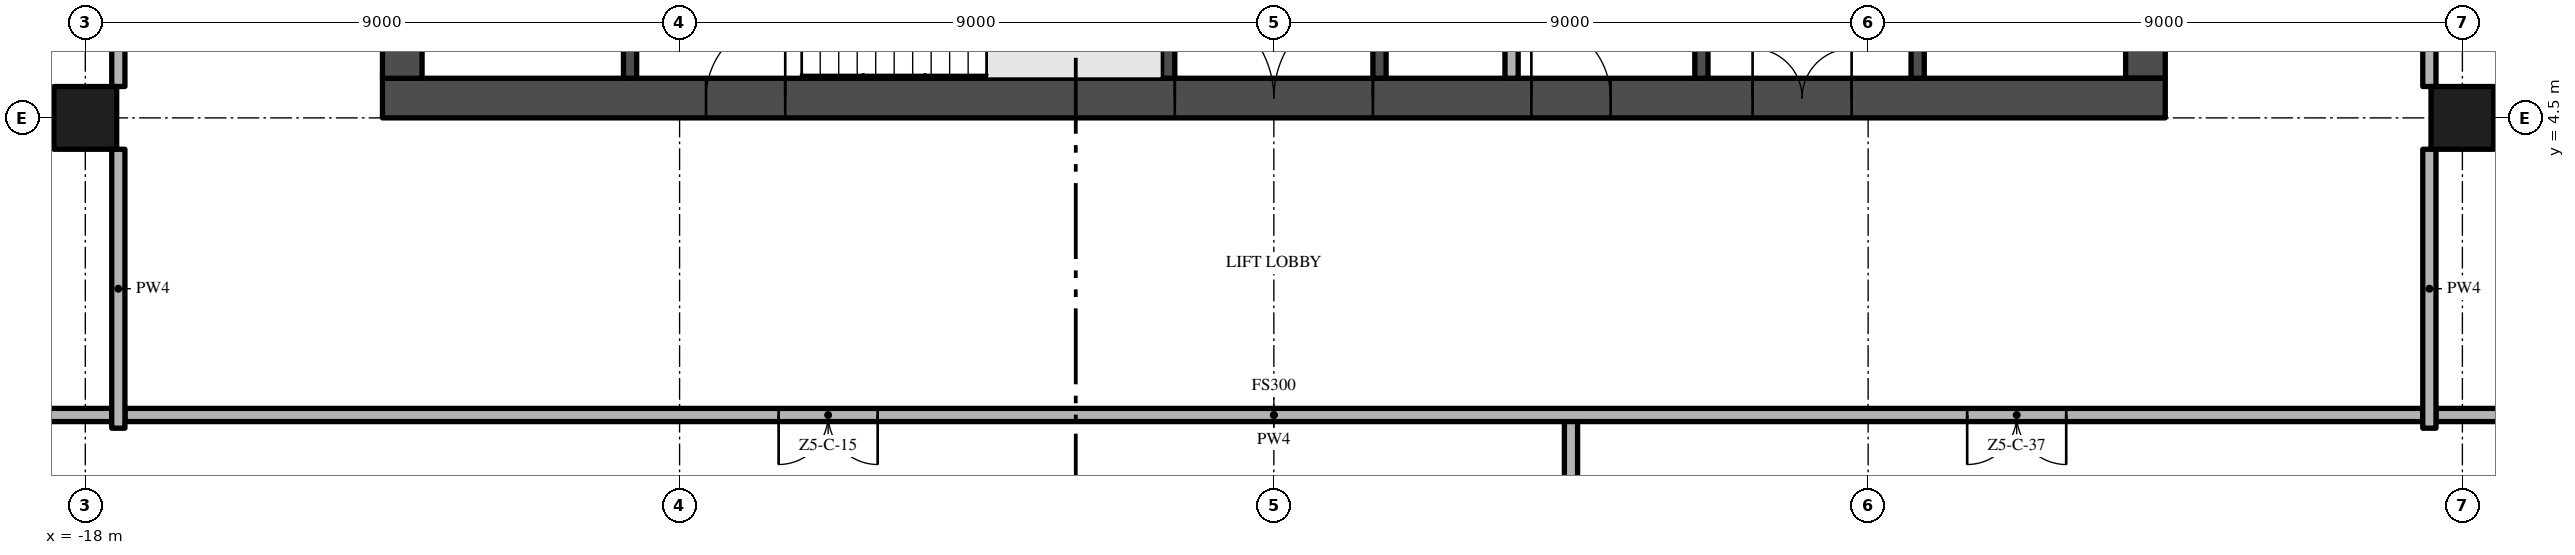
"""IFC4 building model, lengths in metres.
Left out: names, types, materials, properties, quantities, classifications, styles, units other than length and angle.
Written with IfcOpenShell. Run it as: python <this file> out.ifc"""

import sys

from ifc_helpers import new_model, si_unit, direction, frame, frame_2d, origin, origin_2d, place, context, subcontext, project, spatial, rectangle, extrude, element, fill, save


model = new_model("IFC4")
c1 = context("Model", 3, precision=1e-05, world=origin(), true_north=direction((0.0, 1.0)))
c2 = subcontext(c1, "Body", "Model", "MODEL_VIEW")
j1 = project(units=[si_unit("LENGTHUNIT", "METRE"), si_unit("PLANEANGLEUNIT", "RADIAN")], contexts=[c1])
p1 = place(None, origin())
s1 = spatial("IfcSite", under=j1, at=p1, CompositionType="ELEMENT")
p2 = place(p1, origin())
s2 = spatial("IfcBuilding", under=s1, at=p2, CompositionType="ELEMENT")
p3 = place(p2, frame((0.0, 0.0, 265.4)))
s3 = spatial("IfcBuildingStorey", under=s2, at=p3, CompositionType="ELEMENT", Elevation=265.4)
p4 = place(p3, frame((-13.5, 4.8, -0.3), z_axis=(0.0, 0.0, 1.0), x_axis=(1.0, 0.0, 0.0)))
e1 = element("IfcWall", 1, at=p4, inside=s3, PredefinedType="SHEAR", context=c2, shape_type="SweptSolid", body=[
    extrude(rectangle(XDim=27.0, YDim=0.6, at=frame_2d((13.5, 0.0))), origin(), (0.0, 0.0, 1.0), 3.8),
])
p5 = place(p4, frame((12.0, 0.0, 0.3)))
e2 = element("IfcOpeningElement", 2, at=p5, cuts=e1, PredefinedType="OPENING", context=c2, shape_type="SweptSolid", body=[
    extrude(rectangle(XDim=3.0, YDim=2.4, at=frame_2d((1.5, 1.2))), frame((0.0, 0.31, 0.0), z_axis=(0.0, -1.0, 0.0), x_axis=(1.0, 0.0, 0.0)), (0.0, 0.0, 1.0), 0.62),
])
p6 = place(p4, frame((4.9, 0.0, 0.3)))
e3 = element("IfcOpeningElement", 3, at=p6, cuts=e1, PredefinedType="OPENING", context=c2, shape_type="SweptSolid", body=[
    extrude(rectangle(XDim=1.2, YDim=2.2, at=frame_2d((0.6, 1.1))), frame((0.0, 0.31, 0.0), z_axis=(0.0, -1.0, 0.0), x_axis=(1.0, 0.0, 0.0)), (0.0, 0.0, 1.0), 0.62),
])
p7 = place(p4, frame((20.75, 0.0, 0.3)))
e4 = element("IfcOpeningElement", 4, at=p7, cuts=e1, PredefinedType="OPENING", context=c2, shape_type="SweptSolid", body=[
    extrude(rectangle(XDim=1.5, YDim=2.2, at=frame_2d((0.75, 1.1))), frame((0.0, 0.31, 0.0), z_axis=(0.0, -1.0, 0.0), x_axis=(1.0, 0.0, 0.0)), (0.0, 0.0, 1.0), 0.62),
])
p8 = place(p4, frame((17.4, 0.0, 0.3)))
e5 = element("IfcOpeningElement", 5, at=p8, cuts=e1, PredefinedType="OPENING", context=c2, shape_type="SweptSolid", body=[
    extrude(rectangle(XDim=1.2, YDim=2.2, at=frame_2d((0.6, 1.1))), frame((0.0, 0.31, 0.0), z_axis=(0.0, -1.0, 0.0), x_axis=(1.0, 0.0, 0.0)), (0.0, 0.0, 1.0), 0.62),
])
p9 = place(p3, frame((13.2, 5.1, -0.3), z_axis=(0.0, 0.0, 1.0), x_axis=(0.0, 1.0, 0.0)))
e6 = element("IfcWall", 6, at=p9, inside=s3, PredefinedType="SHEAR", context=c2, shape_type="SweptSolid", body=[
    extrude(rectangle(XDim=16.8, YDim=0.6, at=frame_2d((8.4, 0.0))), origin(), (0.0, 0.0, 1.0), 3.8),
])
p10 = place(p9, frame((6.3, 0.0, 0.3)))
e7 = element("IfcOpeningElement", 7, at=p10, cuts=e6, PredefinedType="OPENING", context=c2, shape_type="SweptSolid", body=[
    extrude(rectangle(XDim=1.2, YDim=2.2, at=frame_2d((0.6, 1.1))), frame((0.0, 0.31, 0.0), z_axis=(0.0, -1.0, 0.0), x_axis=(1.0, 0.0, 0.0)), (0.0, 0.0, 1.0), 0.62),
])
p11 = place(p3, frame((-13.2, 21.9, -0.3), z_axis=(0.0, 0.0, 1.0), x_axis=(0.0, -1.0, 0.0)))
e8 = element("IfcWall", 8, at=p11, inside=s3, PredefinedType="SHEAR", context=c2, shape_type="SweptSolid", body=[
    extrude(rectangle(XDim=16.8, YDim=0.6, at=frame_2d((8.4, 0.0))), origin(), (0.0, 0.0, 1.0), 3.8),
])
p12 = place(p11, frame((9.3, 0.0, 0.3)))
e9 = element("IfcOpeningElement", 9, at=p12, cuts=e8, PredefinedType="OPENING", context=c2, shape_type="SweptSolid", body=[
    extrude(rectangle(XDim=1.2, YDim=2.2, at=frame_2d((0.6, 1.1))), frame((0.0, 0.31, 0.0), z_axis=(0.0, -1.0, 0.0), x_axis=(1.0, 0.0, 0.0)), (0.0, 0.0, 1.0), 0.62),
])
for number, where, z_axis, x_axis in (
    (10, (-18.0, 4.5, 0.0), (0.0, 0.0, 1.0), (1.0, 0.0, 0.0)),
    (11, (18.0, 4.5, 0.0), (0.0, 0.0, 1.0), (1.0, 0.0, 0.0)),
):
    element("IfcColumn", number, at=place(p3, frame(where, z_axis=z_axis, x_axis=x_axis)), inside=s3, PredefinedType="COLUMN", context=c2, shape_type="SweptSolid", body=[
        extrude(rectangle(XDim=0.95, YDim=0.95, at=origin_2d()), origin(), (0.0, 0.0, 1.0), 3.5),
    ])
for number, where, z_axis, x_axis in (
    (12, (-9.75, 5.1, 0.0), (0.0, 0.0, 1.0), (0.0, 1.0, 0.0)),
    (13, (-1.6, 5.1, 0.0), (0.0, 0.0, 1.0), (0.0, 1.0, 0.0)),
):
    element("IfcWall", number, at=place(p3, frame(where, z_axis=z_axis, x_axis=x_axis)), inside=s3, PredefinedType="SHEAR", context=c2, shape_type="SweptSolid", body=[
        extrude(rectangle(XDim=2.85, YDim=0.2, at=frame_2d((1.425, 0.0))), origin(), (0.0, 0.0, 1.0), 3.5),
    ])
p13 = place(p3, frame((1.6, 13.5, 0.0), z_axis=(0.0, 0.0, 1.0), x_axis=(0.0, -1.0, 0.0)))
e14 = element("IfcWall", 14, at=p13, inside=s3, PredefinedType="SHEAR", context=c2, shape_type="SweptSolid", body=[
    extrude(rectangle(XDim=8.4, YDim=0.2, at=frame_2d((4.2, 0.0))), origin(), (0.0, 0.0, 1.0), 3.5),
])
p14 = place(p13, frame((3.35, 0.0, 0.0)))
e15 = element("IfcOpeningElement", 15, at=p14, cuts=e14, PredefinedType="OPENING", context=c2, shape_type="SweptSolid", body=[
    extrude(rectangle(XDim=0.9, YDim=2.1, at=frame_2d((0.45, 1.05))), frame((0.0, 0.11, 0.0), z_axis=(0.0, -1.0, 0.0), x_axis=(1.0, 0.0, 0.0)), (0.0, 0.0, 1.0), 0.22),
])
p15 = place(p3, frame((3.6, 13.5, 0.0), z_axis=(0.0, 0.0, 1.0), x_axis=(0.0, -1.0, 0.0)))
e16 = element("IfcWall", 16, at=p15, inside=s3, PredefinedType="PARTITIONING", context=c2, shape_type="SweptSolid", body=[
    extrude(rectangle(XDim=8.4, YDim=0.2, at=frame_2d((4.2, 0.0))), origin(), (0.0, 0.0, 1.0), 3.5),
])
p16 = place(p15, frame((3.75, 0.0, 0.0)))
e17 = element("IfcOpeningElement", 17, at=p16, cuts=e16, PredefinedType="OPENING", context=c2, shape_type="SweptSolid", body=[
    extrude(rectangle(XDim=0.9, YDim=2.1, at=frame_2d((0.45, 1.05))), frame((0.0, 0.11, 0.0), z_axis=(0.0, -1.0, 0.0), x_axis=(1.0, 0.0, 0.0)), (0.0, 0.0, 1.0), 0.22),
])
p17 = place(p3, frame((6.475, 5.1, 0.0), z_axis=(0.0, 0.0, 1.0), x_axis=(0.0, 1.0, 0.0)))
e18 = element("IfcWall", 18, at=p17, inside=s3, PredefinedType="SHEAR", context=c2, shape_type="SweptSolid", body=[
    extrude(rectangle(XDim=7.0, YDim=0.2, at=frame_2d((3.5, 0.0))), origin(), (0.0, 0.0, 1.0), 3.5),
])
p18 = place(p3, frame((9.75, 5.1, 0.0), z_axis=(0.0, 0.0, 1.0), x_axis=(0.0, 1.0, 0.0)))
e19 = element("IfcWall", 19, at=p18, inside=s3, PredefinedType="SHEAR", context=c2, shape_type="SweptSolid", body=[
    extrude(rectangle(XDim=2.5, YDim=0.2, at=frame_2d((1.25, 0.0))), origin(), (0.0, 0.0, 1.0), 3.5),
])
p19 = place(p18, frame((0.85, 0.0, 0.0)))
e20 = element("IfcOpeningElement", 20, at=p19, cuts=e19, PredefinedType="OPENING", context=c2, shape_type="SweptSolid", body=[
    extrude(rectangle(XDim=1.1, YDim=2.1, at=frame_2d((0.55, 1.05))), frame((0.0, 0.11, 0.0), z_axis=(0.0, -1.0, 0.0), x_axis=(1.0, 0.0, 0.0)), (0.0, 0.0, 1.0), 0.22),
])
p20 = place(p3, frame((17.4, 0.0, 0.0), z_axis=(0.0, 0.0, 1.0), x_axis=(-1.0, 0.0, 0.0)))
e21 = element("IfcWall", 21, at=p20, inside=s3, PredefinedType="PARTITIONING", context=c2, shape_type="SweptSolid", body=[
    extrude(rectangle(XDim=34.8, YDim=0.2, at=frame_2d((17.4, 0.0))), origin(), (0.0, 0.0, 1.0), 3.5),
])
p21 = place(p20, frame((23.4, 0.0, 0.0)))
e22 = element("IfcOpeningElement", 22, at=p21, cuts=e21, PredefinedType="OPENING", context=c2, shape_type="SweptSolid", body=[
    extrude(rectangle(XDim=1.5, YDim=2.4, at=frame_2d((0.75, 1.2))), frame((0.0, 0.11, 0.0), z_axis=(0.0, -1.0, 0.0), x_axis=(1.0, 0.0, 0.0)), (0.0, 0.0, 1.0), 0.22),
])
p22 = place(p20, frame((5.4, 0.0, 0.0)))
e23 = element("IfcOpeningElement", 23, at=p22, cuts=e21, PredefinedType="OPENING", context=c2, shape_type="SweptSolid", body=[
    extrude(rectangle(XDim=1.5, YDim=2.4, at=frame_2d((0.75, 1.2))), frame((0.0, 0.11, 0.0), z_axis=(0.0, -1.0, 0.0), x_axis=(1.0, 0.0, 0.0)), (0.0, 0.0, 1.0), 0.22),
])
for number, where, z_axis, x_axis in (
    (24, (-26.7, 0.0, 0.0), (0.0, 0.0, 1.0), (1.0, 0.0, 0.0)),
    (25, (17.6, 0.0, 0.0), (0.0, 0.0, 1.0), (1.0, 0.0, 0.0)),
):
    element("IfcWall", number, at=place(p3, frame(where, z_axis=z_axis, x_axis=x_axis)), inside=s3, PredefinedType="PARTITIONING", context=c2, shape_type="SweptSolid", body=[
        extrude(rectangle(XDim=9.1, YDim=0.2, at=frame_2d((4.55, 0.0))), origin(), (0.0, 0.0, 1.0), 3.5),
    ])
p23 = place(p3, frame((-17.5, -0.2, 0.0), z_axis=(0.0, 0.0, 1.0), x_axis=(0.0, 1.0, 0.0)))
e26 = element("IfcWall", 26, at=p23, inside=s3, PredefinedType="PARTITIONING", context=c2, shape_type="SweptSolid", body=[
    extrude(rectangle(XDim=4.225, YDim=0.2, at=frame_2d((2.112, 0.0))), origin(), (0.0, 0.0, 1.0), 3.5),
])
p24 = place(p3, frame((-17.5, 4.975, 0.0), z_axis=(0.0, 0.0, 1.0), x_axis=(0.0, 1.0, 0.0)))
e27 = element("IfcWall", 27, at=p24, inside=s3, PredefinedType="PARTITIONING", context=c2, shape_type="SweptSolid", body=[
    extrude(rectangle(XDim=8.05, YDim=0.2, at=frame_2d((4.025, 0.0))), origin(), (0.0, 0.0, 1.0), 3.5),
])
p25 = place(p3, frame((4.5, -22.2, 0.0), z_axis=(0.0, 0.0, 1.0), x_axis=(0.0, 1.0, 0.0)))
e28 = element("IfcWall", 28, at=p25, inside=s3, PredefinedType="PARTITIONING", context=c2, shape_type="SweptSolid", body=[
    extrude(rectangle(XDim=22.1, YDim=0.2, at=frame_2d((11.05, 0.0))), origin(), (0.0, 0.0, 1.0), 3.5),
])
p26 = place(p3, frame((17.5, -0.2, 0.0), z_axis=(0.0, 0.0, 1.0), x_axis=(0.0, 1.0, 0.0)))
e29 = element("IfcWall", 29, at=p26, inside=s3, PredefinedType="PARTITIONING", context=c2, shape_type="SweptSolid", body=[
    extrude(rectangle(XDim=4.225, YDim=0.2, at=frame_2d((2.112, 0.0))), origin(), (0.0, 0.0, 1.0), 3.5),
])
p27 = place(p3, frame((17.5, 13.025, 0.0), z_axis=(0.0, 0.0, 1.0), x_axis=(0.0, -1.0, 0.0)))
e30 = element("IfcWall", 30, at=p27, inside=s3, PredefinedType="PARTITIONING", context=c2, shape_type="SweptSolid", body=[
    extrude(rectangle(XDim=8.05, YDim=0.2, at=frame_2d((4.025, 0.0))), origin(), (0.0, 0.0, 1.0), 3.5),
])
p28 = place(p27, frame((5.65, 0.0, 0.0)))
e31 = element("IfcOpeningElement", 31, at=p28, cuts=e30, PredefinedType="OPENING", context=c2, shape_type="SweptSolid", body=[
    extrude(rectangle(XDim=1.2, YDim=2.4, at=frame_2d((0.6, 1.2))), frame((0.0, 0.11, 0.0), z_axis=(0.0, -1.0, 0.0), x_axis=(1.0, 0.0, 0.0)), (0.0, 0.0, 1.0), 0.22),
])
p29 = place(p5, frame((3.0, 0.0, 0.0), z_axis=(0.0, 0.0, 1.0), x_axis=(-1.0, 0.0, 0.0)))
e32 = element("IfcDoor", 32, at=p29, inside=s3, OperationType="DOUBLE_DOOR_SINGLE_SWING", PredefinedType="DOOR", context=c2, shape_type="SweptSolid", body=[
    extrude(rectangle(XDim=3.0, YDim=2.4, at=frame_2d((1.5, 1.2))), frame((0.0, 0.025, 0.0), z_axis=(0.0, -1.0, 0.0), x_axis=(1.0, 0.0, 0.0)), (0.0, 0.0, 1.0), 0.05),
])
fill(e2, e32)
p30 = place(p6, frame((1.2, 0.0, 0.0), z_axis=(0.0, 0.0, 1.0), x_axis=(-1.0, 0.0, 0.0)))
e33 = element("IfcDoor", 33, at=p30, inside=s3, OperationType="SINGLE_SWING_LEFT", PredefinedType="DOOR", context=c2, shape_type="SweptSolid", body=[
    extrude(rectangle(XDim=1.2, YDim=2.2, at=frame_2d((0.6, 1.1))), frame((0.0, 0.025, 0.0), z_axis=(0.0, -1.0, 0.0), x_axis=(1.0, 0.0, 0.0)), (0.0, 0.0, 1.0), 0.05),
])
fill(e3, e33)
p31 = place(p7, frame((1.5, 0.0, 0.0), z_axis=(0.0, 0.0, 1.0), x_axis=(-1.0, 0.0, 0.0)))
e34 = element("IfcDoor", 34, at=p31, inside=s3, OperationType="DOUBLE_DOOR_SINGLE_SWING", PredefinedType="DOOR", context=c2, shape_type="SweptSolid", body=[
    extrude(rectangle(XDim=1.5, YDim=2.2, at=frame_2d((0.75, 1.1))), frame((0.0, 0.025, 0.0), z_axis=(0.0, -1.0, 0.0), x_axis=(1.0, 0.0, 0.0)), (0.0, 0.0, 1.0), 0.05),
])
fill(e4, e34)
p32 = place(p8, frame((1.2, 0.0, 0.0), z_axis=(0.0, 0.0, 1.0), x_axis=(-1.0, 0.0, 0.0)))
e35 = element("IfcDoor", 35, at=p32, inside=s3, OperationType="SINGLE_SWING_RIGHT", PredefinedType="DOOR", context=c2, shape_type="SweptSolid", body=[
    extrude(rectangle(XDim=1.2, YDim=2.2, at=frame_2d((0.6, 1.1))), frame((0.0, 0.025, 0.0), z_axis=(0.0, -1.0, 0.0), x_axis=(1.0, 0.0, 0.0)), (0.0, 0.0, 1.0), 0.05),
])
fill(e5, e35)
p33 = place(p21, origin())
e36 = element("IfcDoor", 36, at=p33, inside=s3, OperationType="DOUBLE_DOOR_SINGLE_SWING", PredefinedType="DOOR", context=c2, shape_type="SweptSolid", body=[
    extrude(rectangle(XDim=1.5, YDim=2.4, at=frame_2d((0.75, 1.2))), frame((0.0, 0.025, 0.0), z_axis=(0.0, -1.0, 0.0), x_axis=(1.0, 0.0, 0.0)), (0.0, 0.0, 1.0), 0.05),
])
fill(e22, e36)
p34 = place(p22, origin())
e37 = element("IfcDoor", 37, at=p34, inside=s3, OperationType="DOUBLE_DOOR_SINGLE_SWING", PredefinedType="DOOR", context=c2, shape_type="SweptSolid", body=[
    extrude(rectangle(XDim=1.5, YDim=2.4, at=frame_2d((0.75, 1.2))), frame((0.0, 0.025, 0.0), z_axis=(0.0, -1.0, 0.0), x_axis=(1.0, 0.0, 0.0)), (0.0, 0.0, 1.0), 0.05),
])
fill(e23, e37)
save(model, sys.argv[1])
